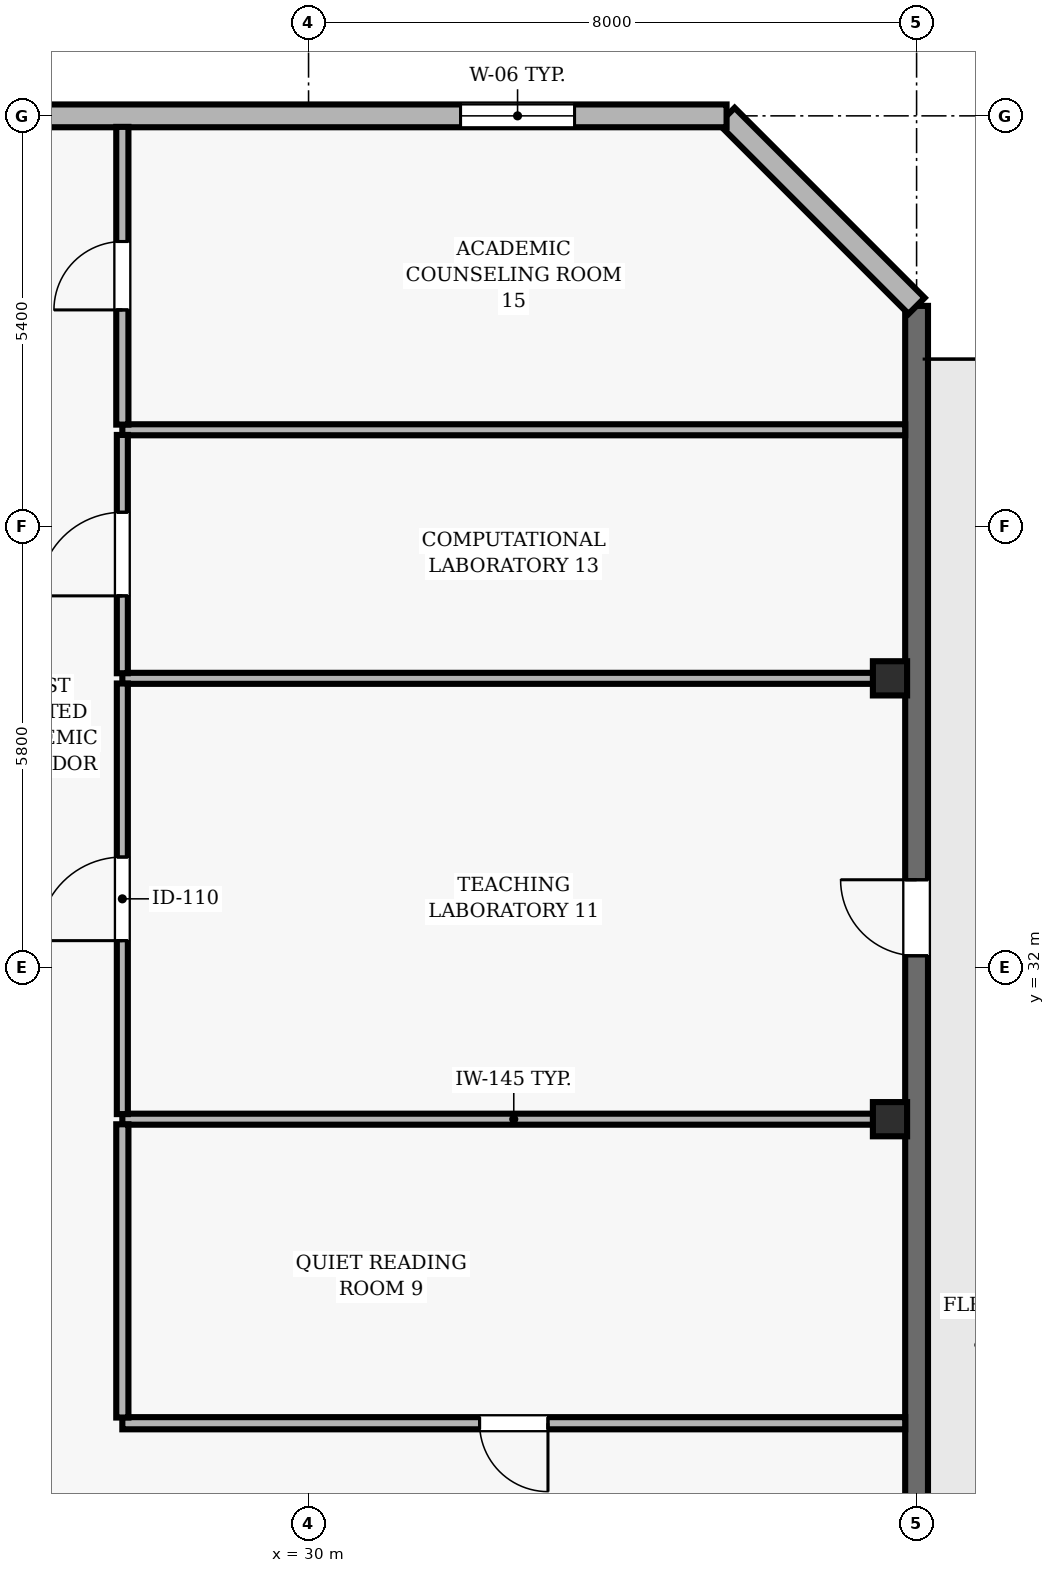
"""IFC4 building model, lengths in metres.
Left out: names, types, materials, properties, quantities, classifications, styles, units other than length and angle.
Written with IfcOpenShell. Run it as: python <this file> out.ifc"""

import sys

from ifc_helpers import new_model, si_unit, direction, frame, frame_2d, origin, origin_2d, place, context, subcontext, project, spatial, rectangle, hollow_rectangle, extrude, element, fill, save


model = new_model("IFC4")
c1 = context("Model", 3, precision=1e-05, world=origin(), true_north=direction((0.0, 1.0)))
c2 = subcontext(c1, "Body", "Model", "MODEL_VIEW")
j1 = project(units=[si_unit("LENGTHUNIT", "METRE"), si_unit("PLANEANGLEUNIT", "RADIAN")], contexts=[c1])
p1 = place(None, origin())
s1 = spatial("IfcSite", under=j1, at=p1, CompositionType="ELEMENT")
p2 = place(p1, origin())
s2 = spatial("IfcBuilding", under=s1, at=p2, CompositionType="ELEMENT")
p3 = place(p2, frame((0.0, 0.0, 226.5)))
s3 = spatial("IfcBuildingStorey", under=s2, at=p3, CompositionType="ELEMENT", Elevation=226.5)
for number, where, z_axis, x_axis in (
    (1, (37.65, 30.0, 0.0), (0.0, 0.0, 1.0), (1.0, 0.0, 0.0)),
    (2, (37.65, 35.8, 0.0), (0.0, 0.0, 1.0), (1.0, 0.0, 0.0)),
):
    element("IfcColumn", number, at=place(p3, frame(where, z_axis=z_axis, x_axis=x_axis)), inside=s3, PredefinedType="COLUMN", context=c2, shape_type="SweptSolid", body=[
        extrude(hollow_rectangle(XDim=0.45, YDim=0.45, WallThickness=0.02, at=origin_2d()), origin(), (0.0, 0.0, 1.0), 3.9),
    ])
p4 = place(p3, frame((38.0, 22.2, 0.0), z_axis=(0.0, 0.0, 1.0), x_axis=(0.0, 1.0, 0.0)))
e3 = element("IfcWall", 3, at=p4, inside=s3, PredefinedType="SOLIDWALL", context=c2, shape_type="SweptSolid", body=[
    extrude(rectangle(XDim=18.5, YDim=0.3, at=frame_2d((9.25, 0.0))), origin(), (0.0, 0.0, 1.0), 3.69),
])
p5 = place(p4, frame((9.95, 0.0, 0.0)))
e4 = element("IfcOpeningElement", 4, at=p5, cuts=e3, PredefinedType="OPENING", context=c2, shape_type="SweptSolid", body=[
    extrude(rectangle(XDim=1.0, YDim=2.2, at=frame_2d((0.5, 1.1))), frame((0.0, 0.16, 0.0), z_axis=(0.0, -1.0, 0.0), x_axis=(1.0, 0.0, 0.0)), (0.0, 0.0, 1.0), 0.32),
])
p6 = place(p3, frame((38.0, 40.7, 0.0), z_axis=(0.0, 0.0, 1.0), x_axis=(-0.707106781187, 0.707106781187, 0.0)))
e5 = element("IfcWall", 5, at=p6, inside=s3, PredefinedType="SOLIDWALL", context=c2, shape_type="SweptSolid", body=[
    extrude(rectangle(XDim=3.536, YDim=0.3, at=frame_2d((1.768, 0.0))), origin(), (0.0, 0.0, 1.0), 3.69),
])
p7 = place(p3, frame((35.5, 43.2, 0.0), z_axis=(0.0, 0.0, 1.0), x_axis=(-1.0, 0.0, 0.0)))
e6 = element("IfcWall", 6, at=p7, inside=s3, PredefinedType="SOLIDWALL", context=c2, shape_type="SweptSolid", body=[
    extrude(rectangle(XDim=11.0, YDim=0.3, at=frame_2d((5.5, 0.0))), origin(), (0.0, 0.0, 1.0), 3.69),
])
p8 = place(p7, frame((2.0, 0.0, 0.9)))
e7 = element("IfcOpeningElement", 7, at=p8, cuts=e6, PredefinedType="OPENING", context=c2, shape_type="SweptSolid", body=[
    extrude(rectangle(XDim=1.5, YDim=1.8, at=frame_2d((0.75, 0.9))), frame((0.0, 0.16, 0.0), z_axis=(0.0, -1.0, 0.0), x_axis=(1.0, 0.0, 0.0)), (0.0, 0.0, 1.0), 0.32),
])
p9 = place(p3, frame((37.85, 26.0, 0.0), z_axis=(0.0, 0.0, 1.0), x_axis=(-1.0, 0.0, 0.0)))
e8 = element("IfcWall", 8, at=p9, inside=s3, PredefinedType="PARTITIONING", context=c2, shape_type="SweptSolid", body=[
    extrude(rectangle(XDim=10.3, YDim=0.16, at=frame_2d((5.15, 0.0))), origin(), (0.0, 0.0, 1.0), 3.69),
])
p10 = place(p9, frame((4.7, 0.0, 0.0)))
e9 = element("IfcOpeningElement", 9, at=p10, cuts=e8, PredefinedType="OPENING", context=c2, shape_type="SweptSolid", body=[
    extrude(rectangle(XDim=0.9, YDim=2.1, at=frame_2d((0.45, 1.05))), frame((0.0, 0.09, 0.0), z_axis=(0.0, -1.0, 0.0), x_axis=(1.0, 0.0, 0.0)), (0.0, 0.0, 1.0), 0.18),
])
for number, where, z_axis, x_axis in (
    (10, (37.85, 30.0, 0.0), (0.0, 0.0, 1.0), (-1.0, 0.0, 0.0)),
    (11, (37.85, 35.8, 0.0), (0.0, 0.0, 1.0), (-1.0, 0.0, 0.0)),
):
    element("IfcWall", number, at=place(p3, frame(where, z_axis=z_axis, x_axis=x_axis)), inside=s3, PredefinedType="PARTITIONING", context=c2, shape_type="SweptSolid", body=[
        extrude(rectangle(XDim=10.3, YDim=0.145, at=frame_2d((5.15, 0.0))), origin(), (0.0, 0.0, 1.0), 3.146),
    ])
p11 = place(p3, frame((37.85, 39.07, 0.0), z_axis=(0.0, 0.0, 1.0), x_axis=(-1.0, 0.0, 0.0)))
e12 = element("IfcWall", 12, at=p11, inside=s3, PredefinedType="PARTITIONING", context=c2, shape_type="SweptSolid", body=[
    extrude(rectangle(XDim=10.3, YDim=0.145, at=frame_2d((5.15, 0.0))), origin(), (0.0, 0.0, 1.0), 3.69),
])
p12 = place(p3, frame((27.55, 26.075, 0.0), z_axis=(0.0, 0.0, 1.0), x_axis=(0.0, 1.0, 0.0)))
e13 = element("IfcWall", 13, at=p12, inside=s3, PredefinedType="PARTITIONING", context=c2, shape_type="SweptSolid", body=[
    extrude(rectangle(XDim=3.858, YDim=0.16, at=frame_2d((1.929, 0.0))), origin(), (0.0, 0.0, 1.0), 3.69),
])
p13 = place(p3, frame((27.55, 30.067, 0.0), z_axis=(0.0, 0.0, 1.0), x_axis=(0.0, 1.0, 0.0)))
e14 = element("IfcWall", 14, at=p13, inside=s3, PredefinedType="PARTITIONING", context=c2, shape_type="SweptSolid", body=[
    extrude(rectangle(XDim=5.665, YDim=0.145, at=frame_2d((2.833, 0.0))), origin(), (0.0, 0.0, 1.0), 3.69),
])
p14 = place(p13, frame((2.282, 0.0, 0.0)))
e15 = element("IfcOpeningElement", 15, at=p14, cuts=e14, PredefinedType="OPENING", context=c2, shape_type="SweptSolid", body=[
    extrude(rectangle(XDim=1.1, YDim=2.15, at=frame_2d((0.55, 1.075))), frame((0.0, 0.083, 0.0), z_axis=(0.0, -1.0, 0.0), x_axis=(1.0, 0.0, 0.0)), (0.0, 0.0, 1.0), 0.165),
])
p15 = place(p3, frame((27.55, 35.867, 0.0), z_axis=(0.0, 0.0, 1.0), x_axis=(0.0, 1.0, 0.0)))
e16 = element("IfcWall", 16, at=p15, inside=s3, PredefinedType="PARTITIONING", context=c2, shape_type="SweptSolid", body=[
    extrude(rectangle(XDim=3.135, YDim=0.145, at=frame_2d((1.567, 0.0))), origin(), (0.0, 0.0, 1.0), 3.69),
])
p16 = place(p15, frame((1.018, 0.0, 0.0)))
e17 = element("IfcOpeningElement", 17, at=p16, cuts=e16, PredefinedType="OPENING", context=c2, shape_type="SweptSolid", body=[
    extrude(rectangle(XDim=1.1, YDim=2.15, at=frame_2d((0.55, 1.075))), frame((0.0, 0.083, 0.0), z_axis=(0.0, -1.0, 0.0), x_axis=(1.0, 0.0, 0.0)), (0.0, 0.0, 1.0), 0.165),
])
p17 = place(p3, frame((27.55, 39.138, 0.0), z_axis=(0.0, 0.0, 1.0), x_axis=(0.0, 1.0, 0.0)))
e18 = element("IfcWall", 18, at=p17, inside=s3, PredefinedType="PARTITIONING", context=c2, shape_type="SweptSolid", body=[
    extrude(rectangle(XDim=3.917, YDim=0.16, at=frame_2d((1.958, 0.0))), origin(), (0.0, 0.0, 1.0), 3.69),
])
p18 = place(p17, frame((1.509, 0.0, 0.0)))
e19 = element("IfcOpeningElement", 19, at=p18, cuts=e18, PredefinedType="OPENING", context=c2, shape_type="SweptSolid", body=[
    extrude(rectangle(XDim=0.9, YDim=2.1, at=frame_2d((0.45, 1.05))), frame((0.0, 0.09, 0.0), z_axis=(0.0, -1.0, 0.0), x_axis=(1.0, 0.0, 0.0)), (0.0, 0.0, 1.0), 0.18),
])
p19 = place(p5, origin())
e20 = element("IfcDoor", 20, at=p19, inside=s3, OperationType="SINGLE_SWING_RIGHT", PredefinedType="DOOR", context=c2, shape_type="SweptSolid", body=[
    extrude(rectangle(XDim=1.0, YDim=2.2, at=frame_2d((0.5, 1.1))), frame((0.0, 0.025, 0.0), z_axis=(0.0, -1.0, 0.0), x_axis=(1.0, 0.0, 0.0)), (0.0, 0.0, 1.0), 0.05),
])
fill(e4, e20)
p20 = place(p8, origin())
e21 = element("IfcWindow", 21, at=p20, inside=s3, PartitioningType="SINGLE_PANEL", PredefinedType="WINDOW", context=c2, shape_type="SweptSolid", body=[
    extrude(rectangle(XDim=1.5, YDim=1.8, at=frame_2d((0.75, 0.9))), frame((0.0, 0.03, 0.0), z_axis=(0.0, -1.0, 0.0), x_axis=(1.0, 0.0, 0.0)), (0.0, 0.0, 1.0), 0.06),
])
fill(e7, e21)
p21 = place(p10, origin())
e22 = element("IfcDoor", 22, at=p21, inside=s3, OperationType="SINGLE_SWING_LEFT", PredefinedType="DOOR", context=c2, shape_type="SweptSolid", body=[
    extrude(rectangle(XDim=0.9, YDim=2.1, at=frame_2d((0.45, 1.05))), frame((0.0, 0.025, 0.0), z_axis=(0.0, -1.0, 0.0), x_axis=(1.0, 0.0, 0.0)), (0.0, 0.0, 1.0), 0.05),
])
fill(e9, e22)
p22 = place(p14, origin())
e23 = element("IfcDoor", 23, at=p22, inside=s3, OperationType="SINGLE_SWING_LEFT", PredefinedType="DOOR", context=c2, shape_type="SweptSolid", body=[
    extrude(rectangle(XDim=1.1, YDim=2.15, at=frame_2d((0.55, 1.075))), frame((0.0, 0.025, 0.0), z_axis=(0.0, -1.0, 0.0), x_axis=(1.0, 0.0, 0.0)), (0.0, 0.0, 1.0), 0.05),
])
fill(e15, e23)
p23 = place(p16, origin())
e24 = element("IfcDoor", 24, at=p23, inside=s3, OperationType="SINGLE_SWING_LEFT", PredefinedType="DOOR", context=c2, shape_type="SweptSolid", body=[
    extrude(rectangle(XDim=1.1, YDim=2.15, at=frame_2d((0.55, 1.075))), frame((0.0, 0.025, 0.0), z_axis=(0.0, -1.0, 0.0), x_axis=(1.0, 0.0, 0.0)), (0.0, 0.0, 1.0), 0.05),
])
fill(e17, e24)
p24 = place(p18, origin())
e25 = element("IfcDoor", 25, at=p24, inside=s3, OperationType="SINGLE_SWING_LEFT", PredefinedType="DOOR", context=c2, shape_type="SweptSolid", body=[
    extrude(rectangle(XDim=0.9, YDim=2.1, at=frame_2d((0.45, 1.05))), frame((0.0, 0.025, 0.0), z_axis=(0.0, -1.0, 0.0), x_axis=(1.0, 0.0, 0.0)), (0.0, 0.0, 1.0), 0.05),
])
fill(e19, e25)
save(model, sys.argv[1])
